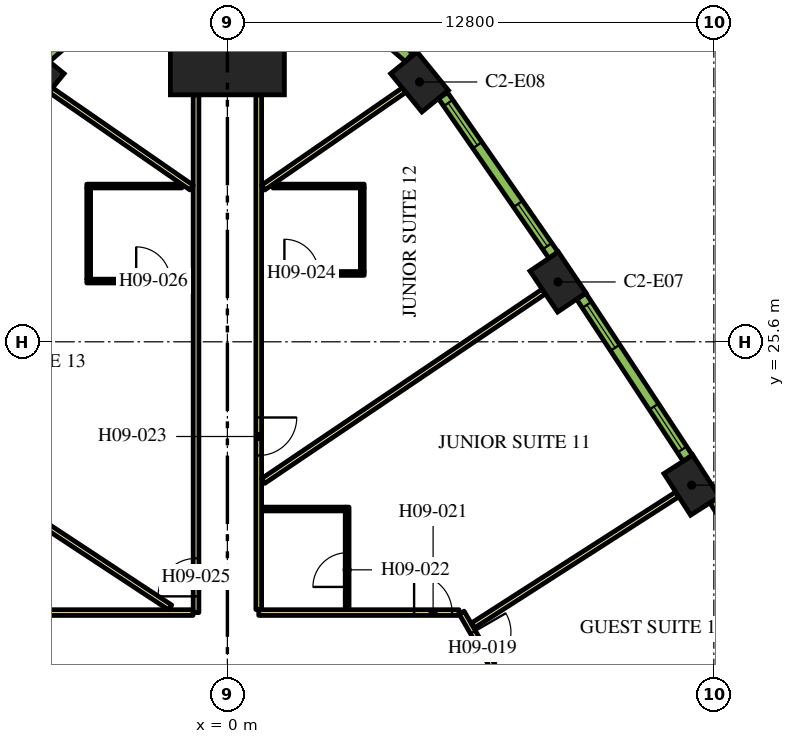
"""IFC4 building model, lengths in metres.
Left out: names, types, materials, properties, quantities, classifications, styles, units other than length and angle.
Written with IfcOpenShell. Run it as: python <this file> out.ifc"""

import sys

from ifc_helpers import new_model, si_unit, direction, frame, frame_2d, origin, origin_2d, place, context, subcontext, project, spatial, rectangle, extrude, element, fill, save


model = new_model("IFC4")
c1 = context("Model", 3, precision=1e-05, world=origin(), true_north=direction((0.0, 1.0)))
c2 = subcontext(c1, "Body", "Model", "MODEL_VIEW")
j1 = project(units=[si_unit("LENGTHUNIT", "METRE"), si_unit("PLANEANGLEUNIT", "RADIAN")], contexts=[c1])
p1 = place(None, origin())
s1 = spatial("IfcSite", under=j1, at=p1, CompositionType="ELEMENT")
p2 = place(p1, origin())
s2 = spatial("IfcBuilding", under=s1, at=p2, CompositionType="ELEMENT")
p3 = place(p2, frame((0.0, 0.0, 122.7)))
s3 = spatial("IfcBuildingStorey", under=s2, at=p3, CompositionType="ELEMENT", Elevation=122.7)
p4 = place(p3, frame((0.0, 33.598, 0.0), z_axis=(0.0, 0.0, 1.0), x_axis=(0.0, 1.0, 0.0)))
e1 = element("IfcColumn", 1, at=p4, inside=s3, PredefinedType="COLUMN", context=c2, shape_type="SweptSolid", body=[
    extrude(rectangle(XDim=3.0, YDim=3.0, at=origin_2d()), origin(), (0.0, 0.0, 1.0), 3.9),
])
for number, where, z_axis, x_axis in (
    (2, (12.217, 21.828, 0.0), (0.0, 0.0, 1.0), (-0.54, 0.842, 0.0)),
    (3, (8.699, 27.174, 0.0), (0.0, 0.0, 1.0), (-0.559, 0.829, 0.0)),
    (4, (5.056, 32.437, 0.0), (0.0, 0.0, 1.0), (-0.632, 0.775, 0.0)),
    (5, (-5.056, 32.437, 0.0), (0.0, 0.0, 1.0), (-0.632, -0.775, 0.0)),
):
    element("IfcColumn", number, at=place(p3, frame(where, z_axis=z_axis, x_axis=x_axis)), inside=s3, PredefinedType="COLUMN", context=c2, shape_type="SweptSolid", body=[
        extrude(rectangle(XDim=1.3, YDim=0.9, at=origin_2d()), origin(), (0.0, 0.0, 1.0), 3.9),
    ])
p5 = place(p3, frame((6.163, 18.475, 0.0), z_axis=(0.0, 0.0, 1.0), x_axis=(0.500001317485, -0.866024643133, 0.0)))
e6 = element("IfcWall", 6, at=p5, inside=s3, PredefinedType="PARTITIONING", context=c2, shape_type="SweptSolid", body=[
    extrude(rectangle(XDim=25.767, YDim=0.15, at=frame_2d((12.883, 0.0))), origin(), (0.0, 0.0, 1.0), 2.75),
])
p6 = place(p5, frame((19.306, 0.0, 0.0)))
e7 = element("IfcOpeningElement", 7, at=p6, cuts=e6, PredefinedType="OPENING", context=c2, shape_type="SweptSolid", body=[
    extrude(rectangle(XDim=1.0, YDim=2.1, at=frame_2d((0.5, 1.05))), frame((0.0, 0.085, 0.0), z_axis=(0.0, -1.0, 0.0), x_axis=(1.0, 0.0, 0.0)), (0.0, 0.0, 1.0), 0.17),
])
p7 = place(p5, frame((17.999, 0.0, 0.0)))
e8 = element("IfcOpeningElement", 8, at=p7, cuts=e6, PredefinedType="OPENING", context=c2, shape_type="SweptSolid", body=[
    extrude(rectangle(XDim=1.0, YDim=2.1, at=frame_2d((0.5, 1.05))), frame((0.0, 0.085, 0.0), z_axis=(0.0, -1.0, 0.0), x_axis=(1.0, 0.0, 0.0)), (0.0, 0.0, 1.0), 0.17),
])
p8 = place(p5, frame((0.596, 0.0, 0.0)))
e9 = element("IfcOpeningElement", 9, at=p8, cuts=e6, PredefinedType="OPENING", context=c2, shape_type="SweptSolid", body=[
    extrude(rectangle(XDim=1.0, YDim=2.1, at=frame_2d((0.5, 1.05))), frame((0.0, 0.085, 0.0), z_axis=(0.0, -1.0, 0.0), x_axis=(1.0, 0.0, 0.0)), (0.0, 0.0, 1.0), 0.17),
])
p9 = place(p3, frame((0.825, 18.475, 0.0), z_axis=(0.0, 0.0, 1.0), x_axis=(1.0, 0.0, 0.0)))
e10 = element("IfcWall", 10, at=p9, inside=s3, PredefinedType="PARTITIONING", context=c2, shape_type="SweptSolid", body=[
    extrude(rectangle(XDim=5.268, YDim=0.15, at=frame_2d((2.634, 0.0))), origin(), (0.0, 0.0, 1.0), 2.75),
])
p10 = place(p9, frame((4.088, 0.0, 0.0)))
e11 = element("IfcOpeningElement", 11, at=p10, cuts=e10, PredefinedType="OPENING", context=c2, shape_type="SweptSolid", body=[
    extrude(rectangle(XDim=1.0, YDim=2.1, at=frame_2d((0.5, 1.05))), frame((0.0, 0.085, 0.0), z_axis=(0.0, -1.0, 0.0), x_axis=(1.0, 0.0, 0.0)), (0.0, 0.0, 1.0), 0.17),
])
p11 = place(p3, frame((0.825, 32.098, 0.0), z_axis=(0.0, 0.0, 1.0), x_axis=(0.0, -1.0, 0.0)))
e12 = element("IfcWall", 12, at=p11, inside=s3, PredefinedType="PARTITIONING", context=c2, shape_type="SweptSolid", body=[
    extrude(rectangle(XDim=13.543, YDim=0.15, at=frame_2d((6.772, 0.0))), origin(), (0.0, 0.0, 1.0), 2.75),
])
p12 = place(p11, frame((8.49, 0.0, 0.0)))
e13 = element("IfcOpeningElement", 13, at=p12, cuts=e12, PredefinedType="OPENING", context=c2, shape_type="SweptSolid", body=[
    extrude(rectangle(XDim=1.0, YDim=2.1, at=frame_2d((0.5, 1.05))), frame((0.0, 0.085, 0.0), z_axis=(0.0, -1.0, 0.0), x_axis=(1.0, 0.0, 0.0)), (0.0, 0.0, 1.0), 0.17),
])
p13 = place(p3, frame((-0.825, 18.475, 0.0), z_axis=(0.0, 0.0, 1.0), x_axis=(0.0, 1.0, 0.0)))
e14 = element("IfcWall", 14, at=p13, inside=s3, PredefinedType="PARTITIONING", context=c2, shape_type="SweptSolid", body=[
    extrude(rectangle(XDim=13.623, YDim=0.15, at=frame_2d((6.812, 0.0))), origin(), (0.0, 0.0, 1.0), 2.75),
])
p14 = place(p13, frame((0.427, 0.0, 0.0)))
e15 = element("IfcOpeningElement", 15, at=p14, cuts=e14, PredefinedType="OPENING", context=c2, shape_type="SweptSolid", body=[
    extrude(rectangle(XDim=1.0, YDim=2.1, at=frame_2d((0.5, 1.05))), frame((0.0, 0.085, 0.0), z_axis=(0.0, -1.0, 0.0), x_axis=(1.0, 0.0, 0.0)), (0.0, 0.0, 1.0), 0.17),
])
p15 = place(p3, frame((-6.163, 18.475, 0.0), z_axis=(0.0, 0.0, 1.0), x_axis=(1.0, 0.0, 0.0)))
e16 = element("IfcWall", 16, at=p15, inside=s3, PredefinedType="PARTITIONING", context=c2, shape_type="SweptSolid", body=[
    extrude(rectangle(XDim=5.258, YDim=0.15, at=frame_2d((2.629, 0.0))), origin(), (0.0, 0.0, 1.0), 2.75),
])
p16 = place(p3, frame((-10.592, 24.589, 0.0), z_axis=(0.0, 0.0, 1.0), x_axis=(0.835337323748, -0.549737715236, 0.0)))
e17 = element("IfcWall", 17, at=p16, inside=s3, PredefinedType="PARTITIONING", context=c2, shape_type="SweptSolid", body=[
    extrude(rectangle(XDim=10.875, YDim=0.15, at=frame_2d((5.438, 0.0))), origin(), (0.0, 0.0, 1.0), 2.75),
])
p17 = place(p3, frame((-4.649, 32.223, 0.0), z_axis=(0.0, 0.0, 1.0), x_axis=(0.822262349475, -0.569108626394, 0.0)))
e18 = element("IfcWall", 18, at=p17, inside=s3, PredefinedType="PARTITIONING", context=c2, shape_type="SweptSolid", body=[
    extrude(rectangle(XDim=4.51, YDim=0.15, at=frame_2d((2.255, 0.0))), origin(), (0.0, 0.0, 1.0), 2.75),
])
p18 = place(p3, frame((8.326, 26.923, 0.0), z_axis=(0.0, 0.0, 1.0), x_axis=(-0.828836601893, -0.5594907393, 0.0)))
e19 = element("IfcWall", 19, at=p18, inside=s3, PredefinedType="PARTITIONING", context=c2, shape_type="SweptSolid", body=[
    extrude(rectangle(XDim=8.909, YDim=0.15, at=frame_2d((4.455, 0.0))), origin(), (0.0, 0.0, 1.0), 2.75),
])
p19 = place(p3, frame((4.649, 32.223, 0.0), z_axis=(0.0, 0.0, 1.0), x_axis=(-0.822262349475, -0.569108626394, 0.0)))
e20 = element("IfcWall", 20, at=p19, inside=s3, PredefinedType="PARTITIONING", context=c2, shape_type="SweptSolid", body=[
    extrude(rectangle(XDim=4.51, YDim=0.15, at=frame_2d((2.255, 0.0))), origin(), (0.0, 0.0, 1.0), 2.75),
])
p20 = place(p3, frame((11.838, 21.585, 0.0), z_axis=(0.0, 0.0, 1.0), x_axis=(-0.841699322813, -0.539946525108, 0.0)))
e21 = element("IfcWall", 21, at=p20, inside=s3, PredefinedType="PARTITIONING", context=c2, shape_type="SweptSolid", body=[
    extrude(rectangle(XDim=6.392, YDim=0.15, at=frame_2d((3.196, 0.0))), origin(), (0.0, 0.0, 1.0), 2.75),
])
p21 = place(p3, frame((3.151, 18.55, 0.0), z_axis=(0.0, 0.0, 1.0), x_axis=(0.0, 1.0, 0.0)))
e22 = element("IfcWall", 22, at=p21, inside=s3, PredefinedType="PARTITIONING", context=c2, shape_type="SweptSolid", body=[
    extrude(rectangle(XDim=2.7, YDim=0.1, at=frame_2d((1.35, 0.0))), origin(), (0.0, 0.0, 1.0), 2.75),
])
p22 = place(p21, frame((0.6, 0.0, 0.0)))
e23 = element("IfcOpeningElement", 23, at=p22, cuts=e22, PredefinedType="OPENING", context=c2, shape_type="SweptSolid", body=[
    extrude(rectangle(XDim=0.9, YDim=2.1, at=frame_2d((0.45, 1.05))), frame((0.0, 0.06, 0.0), z_axis=(0.0, -1.0, 0.0), x_axis=(1.0, 0.0, 0.0)), (0.0, 0.0, 1.0), 0.12),
])
p23 = place(p3, frame((3.101, 21.2, 0.0), z_axis=(0.0, 0.0, 1.0), x_axis=(-1.0, 0.0, 0.0)))
e24 = element("IfcWall", 24, at=p23, inside=s3, PredefinedType="PARTITIONING", context=c2, shape_type="SweptSolid", body=[
    extrude(rectangle(XDim=2.2, YDim=0.1, at=frame_2d((1.1, 0.0))), origin(), (0.0, 0.0, 1.0), 2.75),
])
p24 = place(p3, frame((0.9, 27.398, 0.0), z_axis=(0.0, 0.0, 1.0), x_axis=(1.0, 0.0, 0.0)))
e25 = element("IfcWall", 25, at=p24, inside=s3, PredefinedType="PARTITIONING", context=c2, shape_type="SweptSolid", body=[
    extrude(rectangle(XDim=2.7, YDim=0.1, at=frame_2d((1.35, 0.0))), origin(), (0.0, 0.0, 1.0), 2.75),
])
p25 = place(p24, frame((0.6, 0.0, 0.0)))
e26 = element("IfcOpeningElement", 26, at=p25, cuts=e25, PredefinedType="OPENING", context=c2, shape_type="SweptSolid", body=[
    extrude(rectangle(XDim=0.9, YDim=2.1, at=frame_2d((0.45, 1.05))), frame((0.0, 0.06, 0.0), z_axis=(0.0, -1.0, 0.0), x_axis=(1.0, 0.0, 0.0)), (0.0, 0.0, 1.0), 0.12),
])
p26 = place(p3, frame((3.55, 27.448, 0.0), z_axis=(0.0, 0.0, 1.0), x_axis=(0.0, 1.0, 0.0)))
e27 = element("IfcWall", 27, at=p26, inside=s3, PredefinedType="PARTITIONING", context=c2, shape_type="SweptSolid", body=[
    extrude(rectangle(XDim=2.2, YDim=0.1, at=frame_2d((1.1, 0.0))), origin(), (0.0, 0.0, 1.0), 2.75),
])
p27 = place(p3, frame((1.2, 29.698, 0.0), z_axis=(0.0, 0.0, 1.0), x_axis=(1.0, 0.0, 0.0)))
e28 = element("IfcWall", 28, at=p27, inside=s3, PredefinedType="PARTITIONING", context=c2, shape_type="SweptSolid", body=[
    extrude(rectangle(XDim=2.4, YDim=0.1, at=frame_2d((1.2, 0.0))), origin(), (0.0, 0.0, 1.0), 2.75),
])
p28 = place(p3, frame((-3.7, 27.198, 0.0), z_axis=(0.0, 0.0, 1.0), x_axis=(1.0, 0.0, 0.0)))
e29 = element("IfcWall", 29, at=p28, inside=s3, PredefinedType="PARTITIONING", context=c2, shape_type="SweptSolid", body=[
    extrude(rectangle(XDim=2.8, YDim=0.1, at=frame_2d((1.4, 0.0))), origin(), (0.0, 0.0, 1.0), 2.75),
])
p29 = place(p28, frame((1.3, 0.0, 0.0)))
e30 = element("IfcOpeningElement", 30, at=p29, cuts=e29, PredefinedType="OPENING", context=c2, shape_type="SweptSolid", body=[
    extrude(rectangle(XDim=0.9, YDim=2.1, at=frame_2d((0.45, 1.05))), frame((0.0, 0.06, 0.0), z_axis=(0.0, -1.0, 0.0), x_axis=(1.0, 0.0, 0.0)), (0.0, 0.0, 1.0), 0.12),
])
p30 = place(p3, frame((-3.65, 27.248, 0.0), z_axis=(0.0, 0.0, 1.0), x_axis=(0.0, 1.0, 0.0)))
e31 = element("IfcWall", 31, at=p30, inside=s3, PredefinedType="PARTITIONING", context=c2, shape_type="SweptSolid", body=[
    extrude(rectangle(XDim=2.4, YDim=0.1, at=frame_2d((1.2, 0.0))), origin(), (0.0, 0.0, 1.0), 2.75),
])
p31 = place(p3, frame((-1.2, 29.698, 0.0), z_axis=(0.0, 0.0, 1.0), x_axis=(-1.0, 0.0, 0.0)))
e32 = element("IfcWall", 32, at=p31, inside=s3, PredefinedType="PARTITIONING", context=c2, shape_type="SweptSolid", body=[
    extrude(rectangle(XDim=2.5, YDim=0.1, at=frame_2d((1.25, 0.0))), origin(), (0.0, 0.0, 1.0), 2.75),
])
p32 = place(p3, frame((15.524, 17.114, 0.0), z_axis=(0.0, 0.0, 1.0), x_axis=(-0.530072082134, 0.847952585787, 0.0)))
e33 = element("IfcWall", 33, at=p32, inside=s3, PredefinedType="SOLIDWALL", context=c2, shape_type="SweptSolid", body=[
    extrude(rectangle(XDim=5.1, YDim=0.29, at=frame_2d((2.55, 0.0))), origin(), (0.0, 0.0, 1.0), 3.65),
])
p33 = place(p32, frame((0.273, 0.0, 0.9)))
e34 = element("IfcOpeningElement", 34, at=p33, cuts=e33, PredefinedType="OPENING", context=c2, shape_type="SweptSolid", body=[
    extrude(rectangle(XDim=1.35, YDim=2.15, at=frame_2d((0.675, 1.075))), frame((0.0, 0.155, 0.0), z_axis=(0.0, -1.0, 0.0), x_axis=(1.0, 0.0, 0.0)), (0.0, 0.0, 1.0), 0.31),
])
p34 = place(p32, frame((3.478, 0.0, 0.9)))
e35 = element("IfcOpeningElement", 35, at=p34, cuts=e33, PredefinedType="OPENING", context=c2, shape_type="SweptSolid", body=[
    extrude(rectangle(XDim=1.35, YDim=2.15, at=frame_2d((0.675, 1.075))), frame((0.0, 0.155, 0.0), z_axis=(0.0, -1.0, 0.0), x_axis=(1.0, 0.0, 0.0)), (0.0, 0.0, 1.0), 0.31),
])
p35 = place(p3, frame((12.115, 22.539, 0.0), z_axis=(0.0, 0.0, 1.0), x_axis=(-0.549741341923, 0.835334937005, 0.0)))
e36 = element("IfcWall", 36, at=p35, inside=s3, PredefinedType="SOLIDWALL", context=c2, shape_type="SweptSolid", body=[
    extrude(rectangle(XDim=5.1, YDim=0.29, at=frame_2d((2.55, 0.0))), origin(), (0.0, 0.0, 1.0), 3.65),
])
p36 = place(p35, frame((0.273, 0.0, 0.9)))
e37 = element("IfcOpeningElement", 37, at=p36, cuts=e36, PredefinedType="OPENING", context=c2, shape_type="SweptSolid", body=[
    extrude(rectangle(XDim=1.35, YDim=2.15, at=frame_2d((0.675, 1.075))), frame((0.0, 0.155, 0.0), z_axis=(0.0, -1.0, 0.0), x_axis=(1.0, 0.0, 0.0)), (0.0, 0.0, 1.0), 0.31),
])
p37 = place(p35, frame((3.478, 0.0, 0.9)))
e38 = element("IfcOpeningElement", 38, at=p37, cuts=e36, PredefinedType="OPENING", context=c2, shape_type="SweptSolid", body=[
    extrude(rectangle(XDim=1.35, YDim=2.15, at=frame_2d((0.675, 1.075))), frame((0.0, 0.155, 0.0), z_axis=(0.0, -1.0, 0.0), x_axis=(1.0, 0.0, 0.0)), (0.0, 0.0, 1.0), 0.31),
])
p38 = place(p3, frame((8.58, 27.882, 0.0), z_axis=(0.0, 0.0, 1.0), x_axis=(-0.569113019126, 0.822259309136, 0.0)))
e39 = element("IfcWall", 39, at=p38, inside=s3, PredefinedType="SOLIDWALL", context=c2, shape_type="SweptSolid", body=[
    extrude(rectangle(XDim=5.107, YDim=0.29, at=frame_2d((2.553, 0.0))), origin(), (0.0, 0.0, 1.0), 3.65),
])
p39 = place(p38, frame((0.285, 0.0, 0.9)))
e40 = element("IfcOpeningElement", 40, at=p39, cuts=e39, PredefinedType="OPENING", context=c2, shape_type="SweptSolid", body=[
    extrude(rectangle(XDim=1.35, YDim=2.15, at=frame_2d((0.675, 1.075))), frame((0.0, 0.155, 0.0), z_axis=(0.0, -1.0, 0.0), x_axis=(1.0, 0.0, 0.0)), (0.0, 0.0, 1.0), 0.31),
])
p40 = place(p38, frame((3.516, 0.0, 0.9)))
e41 = element("IfcOpeningElement", 41, at=p40, cuts=e39, PredefinedType="OPENING", context=c2, shape_type="SweptSolid", body=[
    extrude(rectangle(XDim=1.35, YDim=2.15, at=frame_2d((0.675, 1.075))), frame((0.0, 0.155, 0.0), z_axis=(0.0, -1.0, 0.0), x_axis=(1.0, 0.0, 0.0)), (0.0, 0.0, 1.0), 0.31),
])
p41 = place(p3, frame((4.778, 33.082, 0.0), z_axis=(0.0, 0.0, 1.0), x_axis=(-0.754882764627, 0.655859749999, 0.0)))
e42 = element("IfcWall", 42, at=p41, inside=s3, PredefinedType="SOLIDWALL", context=c2, shape_type="SweptSolid", body=[
    extrude(rectangle(XDim=1.82, YDim=0.29, at=frame_2d((0.91, 0.0))), origin(), (0.0, 0.0, 1.0), 3.65),
])
p42 = place(p41, frame((0.46, 0.0, 0.9)))
e43 = element("IfcOpeningElement", 43, at=p42, cuts=e42, PredefinedType="OPENING", context=c2, shape_type="SweptSolid", body=[
    extrude(rectangle(XDim=0.9, YDim=2.15, at=frame_2d((0.45, 1.075))), frame((0.0, 0.155, 0.0), z_axis=(0.0, -1.0, 0.0), x_axis=(1.0, 0.0, 0.0)), (0.0, 0.0, 1.0), 0.31),
])
p43 = place(p3, frame((-3.405, 34.275, 0.0), z_axis=(0.0, 0.0, 1.0), x_axis=(-0.754882764627, -0.655859749999, 0.0)))
e44 = element("IfcWall", 44, at=p43, inside=s3, PredefinedType="SOLIDWALL", context=c2, shape_type="SweptSolid", body=[
    extrude(rectangle(XDim=1.82, YDim=0.29, at=frame_2d((0.91, 0.0))), origin(), (0.0, 0.0, 1.0), 3.65),
])
p44 = place(p43, frame((0.46, 0.0, 0.9)))
e45 = element("IfcOpeningElement", 45, at=p44, cuts=e44, PredefinedType="OPENING", context=c2, shape_type="SweptSolid", body=[
    extrude(rectangle(XDim=0.9, YDim=2.15, at=frame_2d((0.45, 1.075))), frame((0.0, 0.155, 0.0), z_axis=(0.0, -1.0, 0.0), x_axis=(1.0, 0.0, 0.0)), (0.0, 0.0, 1.0), 0.31),
])
p45 = place(p8, origin())
e46 = element("IfcDoor", 46, at=p45, inside=s3, OperationType="SINGLE_SWING_LEFT", PredefinedType="DOOR", context=c2, shape_type="SweptSolid", body=[
    extrude(rectangle(XDim=1.0, YDim=2.1, at=frame_2d((0.5, 1.05))), frame((0.0, 0.025, 0.0), z_axis=(0.0, -1.0, 0.0), x_axis=(1.0, 0.0, 0.0)), (0.0, 0.0, 1.0), 0.05),
])
fill(e9, e46)
p46 = place(p10, origin())
e47 = element("IfcDoor", 47, at=p46, inside=s3, OperationType="SINGLE_SWING_RIGHT", PredefinedType="DOOR", context=c2, shape_type="SweptSolid", body=[
    extrude(rectangle(XDim=1.0, YDim=2.1, at=frame_2d((0.5, 1.05))), frame((0.0, 0.025, 0.0), z_axis=(0.0, -1.0, 0.0), x_axis=(1.0, 0.0, 0.0)), (0.0, 0.0, 1.0), 0.05),
])
fill(e11, e47)
p47 = place(p22, origin())
e48 = element("IfcDoor", 48, at=p47, inside=s3, OperationType="SINGLE_SWING_LEFT", PredefinedType="DOOR", context=c2, shape_type="SweptSolid", body=[
    extrude(rectangle(XDim=0.9, YDim=2.1, at=frame_2d((0.45, 1.05))), frame((0.0, 0.025, 0.0), z_axis=(0.0, -1.0, 0.0), x_axis=(1.0, 0.0, 0.0)), (0.0, 0.0, 1.0), 0.05),
])
fill(e23, e48)
p48 = place(p12, origin())
e49 = element("IfcDoor", 49, at=p48, inside=s3, OperationType="SINGLE_SWING_RIGHT", PredefinedType="DOOR", context=c2, shape_type="SweptSolid", body=[
    extrude(rectangle(XDim=1.0, YDim=2.1, at=frame_2d((0.5, 1.05))), frame((0.0, 0.025, 0.0), z_axis=(0.0, -1.0, 0.0), x_axis=(1.0, 0.0, 0.0)), (0.0, 0.0, 1.0), 0.05),
])
fill(e13, e49)
p49 = place(p25, origin())
e50 = element("IfcDoor", 50, at=p49, inside=s3, OperationType="SINGLE_SWING_RIGHT", PredefinedType="DOOR", context=c2, shape_type="SweptSolid", body=[
    extrude(rectangle(XDim=0.9, YDim=2.1, at=frame_2d((0.45, 1.05))), frame((0.0, 0.025, 0.0), z_axis=(0.0, -1.0, 0.0), x_axis=(1.0, 0.0, 0.0)), (0.0, 0.0, 1.0), 0.05),
])
fill(e26, e50)
p50 = place(p14, origin())
e51 = element("IfcDoor", 51, at=p50, inside=s3, OperationType="SINGLE_SWING_LEFT", PredefinedType="DOOR", context=c2, shape_type="SweptSolid", body=[
    extrude(rectangle(XDim=1.0, YDim=2.1, at=frame_2d((0.5, 1.05))), frame((0.0, 0.025, 0.0), z_axis=(0.0, -1.0, 0.0), x_axis=(1.0, 0.0, 0.0)), (0.0, 0.0, 1.0), 0.05),
])
fill(e15, e51)
p51 = place(p29, origin())
e52 = element("IfcDoor", 52, at=p51, inside=s3, OperationType="SINGLE_SWING_LEFT", PredefinedType="DOOR", context=c2, shape_type="SweptSolid", body=[
    extrude(rectangle(XDim=0.9, YDim=2.1, at=frame_2d((0.45, 1.05))), frame((0.0, 0.025, 0.0), z_axis=(0.0, -1.0, 0.0), x_axis=(1.0, 0.0, 0.0)), (0.0, 0.0, 1.0), 0.05),
])
fill(e30, e52)
p52 = place(p36, origin())
e53 = element("IfcWindow", 53, at=p52, inside=s3, PartitioningType="DOUBLE_PANEL_VERTICAL", PredefinedType="WINDOW", context=c2, shape_type="SweptSolid", body=[
    extrude(rectangle(XDim=1.35, YDim=2.15, at=frame_2d((0.675, 1.075))), frame((0.0, 0.015, 0.0), z_axis=(0.0, -1.0, 0.0), x_axis=(1.0, 0.0, 0.0)), (0.0, 0.0, 1.0), 0.06),
])
fill(e37, e53)
p53 = place(p37, origin())
e54 = element("IfcWindow", 54, at=p53, inside=s3, PartitioningType="DOUBLE_PANEL_VERTICAL", PredefinedType="WINDOW", context=c2, shape_type="SweptSolid", body=[
    extrude(rectangle(XDim=1.35, YDim=2.15, at=frame_2d((0.675, 1.075))), frame((0.0, 0.015, 0.0), z_axis=(0.0, -1.0, 0.0), x_axis=(1.0, 0.0, 0.0)), (0.0, 0.0, 1.0), 0.06),
])
fill(e38, e54)
p54 = place(p39, origin())
e55 = element("IfcWindow", 55, at=p54, inside=s3, PartitioningType="DOUBLE_PANEL_VERTICAL", PredefinedType="WINDOW", context=c2, shape_type="SweptSolid", body=[
    extrude(rectangle(XDim=1.35, YDim=2.15, at=frame_2d((0.675, 1.075))), frame((0.0, 0.015, 0.0), z_axis=(0.0, -1.0, 0.0), x_axis=(1.0, 0.0, 0.0)), (0.0, 0.0, 1.0), 0.06),
])
fill(e40, e55)
p55 = place(p40, origin())
e56 = element("IfcWindow", 56, at=p55, inside=s3, PartitioningType="DOUBLE_PANEL_VERTICAL", PredefinedType="WINDOW", context=c2, shape_type="SweptSolid", body=[
    extrude(rectangle(XDim=1.35, YDim=2.15, at=frame_2d((0.675, 1.075))), frame((0.0, 0.015, 0.0), z_axis=(0.0, -1.0, 0.0), x_axis=(1.0, 0.0, 0.0)), (0.0, 0.0, 1.0), 0.06),
])
fill(e41, e56)
save(model, sys.argv[1])
